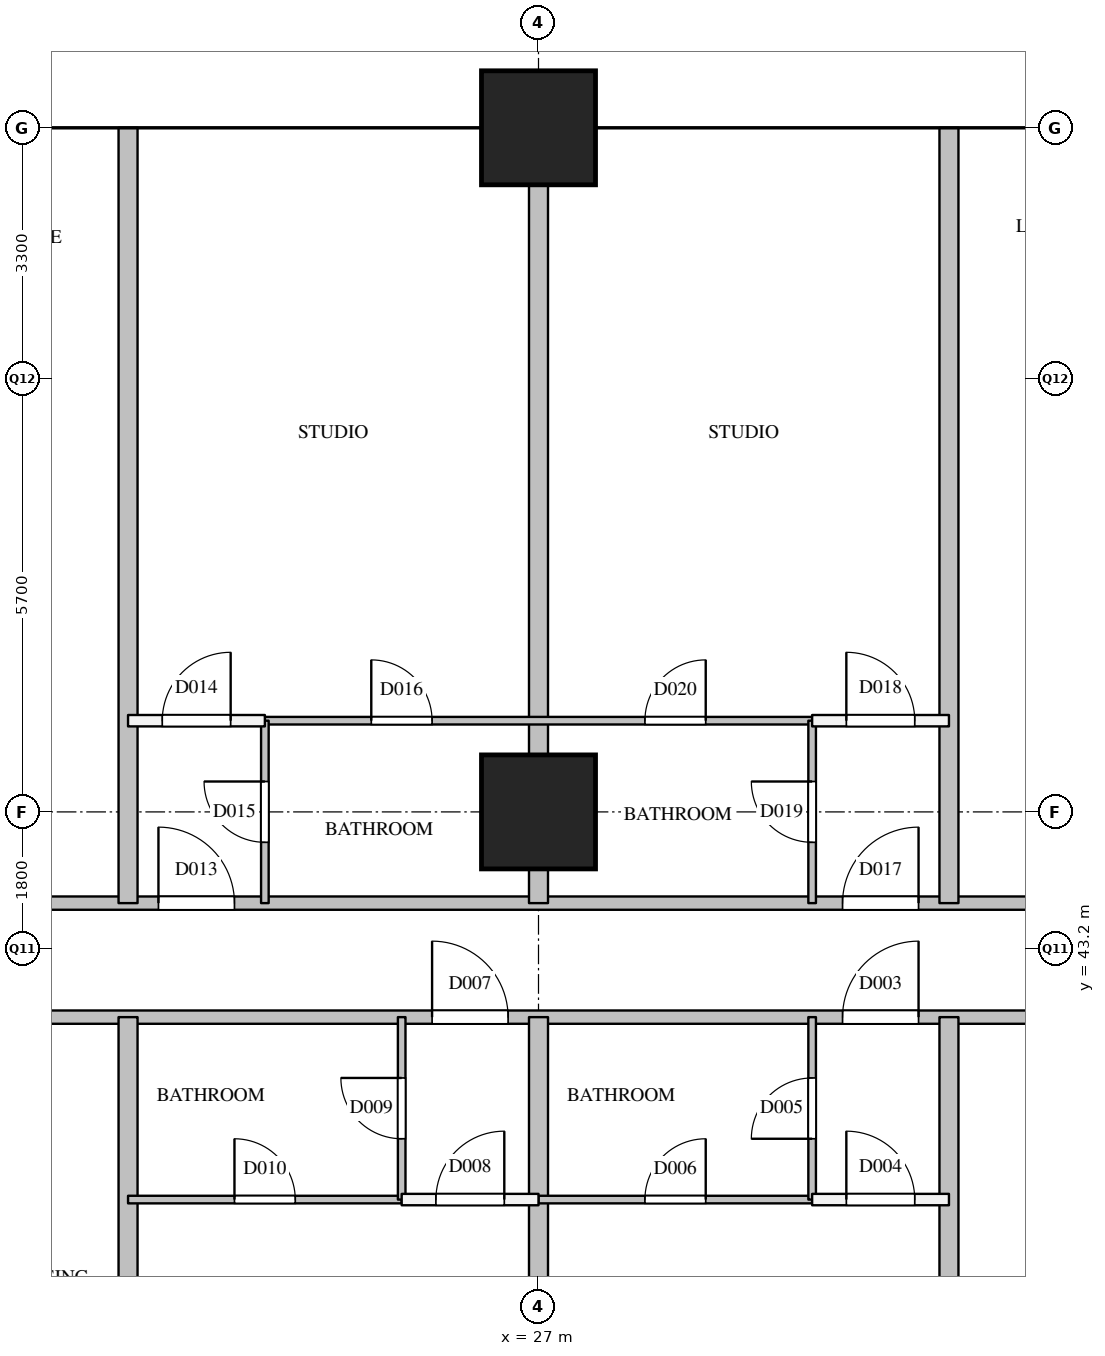
"""IFC4 building model, lengths in metres.
Left out: names, types, materials, properties, quantities, classifications, styles, units other than length and angle.
Written with IfcOpenShell. Run it as: python <this file> out.ifc"""

import sys

from ifc_helpers import new_model, si_unit, direction, frame, frame_2d, origin, origin_2d, place, context, subcontext, project, spatial, rectangle, extrude, element, fill, save


model = new_model("IFC4")
c1 = context("Model", 3, precision=1e-05, world=origin(), true_north=direction((0.0, 1.0)))
c2 = subcontext(c1, "Body", "Model", "MODEL_VIEW")
j1 = project(units=[si_unit("LENGTHUNIT", "METRE"), si_unit("PLANEANGLEUNIT", "RADIAN")], contexts=[c1])
p1 = place(None, origin())
s1 = spatial("IfcSite", under=j1, at=p1, CompositionType="ELEMENT")
p2 = place(p1, origin())
s2 = spatial("IfcBuilding", under=s1, at=p2, CompositionType="ELEMENT")
p3 = place(p2, frame((0.0, 0.0, 193.4)))
s3 = spatial("IfcBuildingStorey", under=s2, at=p3, CompositionType="ELEMENT", Elevation=193.4)
for number, where, z_axis, x_axis in (
    (1, (27.0, 45.0, 0.0), (0.0, 0.0, 1.0), (1.0, 0.0, 0.0)),
    (2, (27.0, 54.0, 0.0), (0.0, 0.0, 1.0), (1.0, 0.0, 0.0)),
):
    element("IfcColumn", number, at=place(p3, frame(where, z_axis=z_axis, x_axis=x_axis)), inside=s3, PredefinedType="COLUMN", context=c2, shape_type="SweptSolid", body=[
        extrude(rectangle(XDim=1.5, YDim=1.5, at=origin_2d()), origin(), (0.0, 0.0, 1.0), 3.9),
    ])
p4 = place(p3, frame((19.5, 42.3, 0.0), z_axis=(0.0, 0.0, 1.0), x_axis=(1.0, 0.0, 0.0)))
e3 = element("IfcWall", 3, at=p4, inside=s3, PredefinedType="PARTITIONING", context=c2, shape_type="SweptSolid", body=[
    extrude(rectangle(XDim=15.0, YDim=0.175, at=frame_2d((7.5, 0.0))), origin(), (0.0, 0.0, 1.0), 2.4),
])
p5 = place(p4, frame((11.5, 0.0, 0.0)))
e4 = element("IfcOpeningElement", 4, at=p5, cuts=e3, PredefinedType="OPENING", context=c2, shape_type="SweptSolid", body=[
    extrude(rectangle(XDim=1.0, YDim=2.1, at=frame_2d((0.5, 1.05))), frame((0.0, 0.097, 0.0), z_axis=(0.0, -1.0, 0.0), x_axis=(1.0, 0.0, 0.0)), (0.0, 0.0, 1.0), 0.195),
])
p6 = place(p4, frame((6.1, 0.0, 0.0)))
e5 = element("IfcOpeningElement", 5, at=p6, cuts=e3, PredefinedType="OPENING", context=c2, shape_type="SweptSolid", body=[
    extrude(rectangle(XDim=1.0, YDim=2.1, at=frame_2d((0.5, 1.05))), frame((0.0, 0.097, 0.0), z_axis=(0.0, -1.0, 0.0), x_axis=(1.0, 0.0, 0.0)), (0.0, 0.0, 1.0), 0.195),
])
p7 = place(p3, frame((19.5, 43.8, 0.0), z_axis=(0.0, 0.0, 1.0), x_axis=(1.0, 0.0, 0.0)))
e6 = element("IfcWall", 6, at=p7, inside=s3, PredefinedType="PARTITIONING", context=c2, shape_type="SweptSolid", body=[
    extrude(rectangle(XDim=15.0, YDim=0.175, at=frame_2d((7.5, 0.0))), origin(), (0.0, 0.0, 1.0), 2.4),
])
p8 = place(p7, frame((2.5, 0.0, 0.0)))
e7 = element("IfcOpeningElement", 7, at=p8, cuts=e6, PredefinedType="OPENING", context=c2, shape_type="SweptSolid", body=[
    extrude(rectangle(XDim=1.0, YDim=2.1, at=frame_2d((0.5, 1.05))), frame((0.0, 0.097, 0.0), z_axis=(0.0, -1.0, 0.0), x_axis=(1.0, 0.0, 0.0)), (0.0, 0.0, 1.0), 0.195),
])
p9 = place(p7, frame((11.5, 0.0, 0.0)))
e8 = element("IfcOpeningElement", 8, at=p9, cuts=e6, PredefinedType="OPENING", context=c2, shape_type="SweptSolid", body=[
    extrude(rectangle(XDim=1.0, YDim=2.1, at=frame_2d((0.5, 1.05))), frame((0.0, 0.097, 0.0), z_axis=(0.0, -1.0, 0.0), x_axis=(1.0, 0.0, 0.0)), (0.0, 0.0, 1.0), 0.195),
])
p10 = place(p3, frame((25.2, 39.9, 0.0), z_axis=(0.0, 0.0, 1.0), x_axis=(1.0, 0.0, 0.0)))
e9 = element("IfcWall", 9, at=p10, inside=s3, PredefinedType="PARTITIONING", context=c2, shape_type="SweptSolid", body=[
    extrude(rectangle(XDim=1.8, YDim=0.15, at=frame_2d((0.9, 0.0))), origin(), (0.0, 0.0, 1.0), 2.4),
])
p11 = place(p10, frame((0.45, 0.0, 0.0)))
e10 = element("IfcOpeningElement", 10, at=p11, cuts=e9, PredefinedType="OPENING", context=c2, shape_type="SweptSolid", body=[
    extrude(rectangle(XDim=0.9, YDim=2.1, at=frame_2d((0.45, 1.05))), frame((0.0, 0.085, 0.0), z_axis=(0.0, -1.0, 0.0), x_axis=(1.0, 0.0, 0.0)), (0.0, 0.0, 1.0), 0.17),
])
p12 = place(p3, frame((30.6, 39.9, 0.0), z_axis=(0.0, 0.0, 1.0), x_axis=(1.0, 0.0, 0.0)))
e11 = element("IfcWall", 11, at=p12, inside=s3, PredefinedType="PARTITIONING", context=c2, shape_type="SweptSolid", body=[
    extrude(rectangle(XDim=1.8, YDim=0.15, at=frame_2d((0.9, 0.0))), origin(), (0.0, 0.0, 1.0), 3.4),
])
p13 = place(p12, frame((0.45, 0.0, 0.0)))
e12 = element("IfcOpeningElement", 12, at=p13, cuts=e11, PredefinedType="OPENING", context=c2, shape_type="SweptSolid", body=[
    extrude(rectangle(XDim=0.9, YDim=2.1, at=frame_2d((0.45, 1.05))), frame((0.0, 0.085, 0.0), z_axis=(0.0, -1.0, 0.0), x_axis=(1.0, 0.0, 0.0)), (0.0, 0.0, 1.0), 0.17),
])
p14 = place(p3, frame((21.6, 46.2, 0.0), z_axis=(0.0, 0.0, 1.0), x_axis=(1.0, 0.0, 0.0)))
e13 = element("IfcWall", 13, at=p14, inside=s3, PredefinedType="PARTITIONING", context=c2, shape_type="SweptSolid", body=[
    extrude(rectangle(XDim=1.8, YDim=0.15, at=frame_2d((0.9, 0.0))), origin(), (0.0, 0.0, 1.0), 3.4),
])
p15 = place(p14, frame((0.45, 0.0, 0.0)))
e14 = element("IfcOpeningElement", 14, at=p15, cuts=e13, PredefinedType="OPENING", context=c2, shape_type="SweptSolid", body=[
    extrude(rectangle(XDim=0.9, YDim=2.1, at=frame_2d((0.45, 1.05))), frame((0.0, 0.085, 0.0), z_axis=(0.0, -1.0, 0.0), x_axis=(1.0, 0.0, 0.0)), (0.0, 0.0, 1.0), 0.17),
])
p16 = place(p3, frame((30.6, 46.2, 0.0), z_axis=(0.0, 0.0, 1.0), x_axis=(1.0, 0.0, 0.0)))
e15 = element("IfcWall", 15, at=p16, inside=s3, PredefinedType="PARTITIONING", context=c2, shape_type="SweptSolid", body=[
    extrude(rectangle(XDim=1.8, YDim=0.15, at=frame_2d((0.9, 0.0))), origin(), (0.0, 0.0, 1.0), 3.4),
])
p17 = place(p16, frame((0.45, 0.0, 0.0)))
e16 = element("IfcOpeningElement", 16, at=p17, cuts=e15, PredefinedType="OPENING", context=c2, shape_type="SweptSolid", body=[
    extrude(rectangle(XDim=0.9, YDim=2.1, at=frame_2d((0.45, 1.05))), frame((0.0, 0.085, 0.0), z_axis=(0.0, -1.0, 0.0), x_axis=(1.0, 0.0, 0.0)), (0.0, 0.0, 1.0), 0.17),
])
p18 = place(p3, frame((21.6, 27.0, 0.0), z_axis=(0.0, 0.0, 1.0), x_axis=(0.0, 1.0, 0.0)))
e17 = element("IfcWall", 17, at=p18, inside=s3, PredefinedType="PARTITIONING", context=c2, shape_type="SweptSolid", body=[
    extrude(rectangle(XDim=15.3, YDim=0.25, at=frame_2d((7.65, 0.0))), origin(), (0.0, 0.0, 1.0), 2.4),
])
p19 = place(p3, frame((21.6, 43.8, 0.0), z_axis=(0.0, 0.0, 1.0), x_axis=(0.0, 1.0, 0.0)))
e18 = element("IfcWall", 18, at=p19, inside=s3, PredefinedType="PARTITIONING", context=c2, shape_type="SweptSolid", body=[
    extrude(rectangle(XDim=10.2, YDim=0.25, at=frame_2d((5.1, 0.0))), origin(), (0.0, 0.0, 1.0), 2.4),
])
p20 = place(p3, frame((27.0, 27.0, 0.0), z_axis=(0.0, 0.0, 1.0), x_axis=(0.0, 1.0, 0.0)))
e19 = element("IfcWall", 19, at=p20, inside=s3, PredefinedType="PARTITIONING", context=c2, shape_type="SweptSolid", body=[
    extrude(rectangle(XDim=15.3, YDim=0.25, at=frame_2d((7.65, 0.0))), origin(), (0.0, 0.0, 1.0), 2.4),
])
p21 = place(p3, frame((27.0, 43.8, 0.0), z_axis=(0.0, 0.0, 1.0), x_axis=(0.0, 1.0, 0.0)))
e20 = element("IfcWall", 20, at=p21, inside=s3, PredefinedType="PARTITIONING", context=c2, shape_type="SweptSolid", body=[
    extrude(rectangle(XDim=10.2, YDim=0.25, at=frame_2d((5.1, 0.0))), origin(), (0.0, 0.0, 1.0), 2.4),
])
p22 = place(p3, frame((32.4, 27.0, 0.0), z_axis=(0.0, 0.0, 1.0), x_axis=(0.0, 1.0, 0.0)))
e21 = element("IfcWall", 21, at=p22, inside=s3, PredefinedType="PARTITIONING", context=c2, shape_type="SweptSolid", body=[
    extrude(rectangle(XDim=15.3, YDim=0.25, at=frame_2d((7.65, 0.0))), origin(), (0.0, 0.0, 1.0), 2.4),
])
p23 = place(p3, frame((32.4, 43.8, 0.0), z_axis=(0.0, 0.0, 1.0), x_axis=(0.0, 1.0, 0.0)))
e22 = element("IfcWall", 22, at=p23, inside=s3, PredefinedType="PARTITIONING", context=c2, shape_type="SweptSolid", body=[
    extrude(rectangle(XDim=10.2, YDim=0.25, at=frame_2d((5.1, 0.0))), origin(), (0.0, 0.0, 1.0), 2.4),
])
p24 = place(p3, frame((21.6, 39.9, 0.0), z_axis=(0.0, 0.0, 1.0), x_axis=(1.0, 0.0, 0.0)))
e23 = element("IfcWall", 23, at=p24, inside=s3, PredefinedType="PARTITIONING", context=c2, shape_type="SweptSolid", body=[
    extrude(rectangle(XDim=3.6, YDim=0.1, at=frame_2d((1.8, 0.0))), origin(), (0.0, 0.0, 1.0), 3.4),
])
p25 = place(p24, frame((1.4, 0.0, 0.0)))
e24 = element("IfcOpeningElement", 24, at=p25, cuts=e23, PredefinedType="OPENING", context=c2, shape_type="SweptSolid", body=[
    extrude(rectangle(XDim=0.8, YDim=2.1, at=frame_2d((0.4, 1.05))), frame((0.0, 0.06, 0.0), z_axis=(0.0, -1.0, 0.0), x_axis=(1.0, 0.0, 0.0)), (0.0, 0.0, 1.0), 0.12),
])
p26 = place(p3, frame((27.0, 39.9, 0.0), z_axis=(0.0, 0.0, 1.0), x_axis=(1.0, 0.0, 0.0)))
e25 = element("IfcWall", 25, at=p26, inside=s3, PredefinedType="PARTITIONING", context=c2, shape_type="SweptSolid", body=[
    extrude(rectangle(XDim=3.6, YDim=0.1, at=frame_2d((1.8, 0.0))), origin(), (0.0, 0.0, 1.0), 2.4),
])
p27 = place(p26, frame((1.4, 0.0, 0.0)))
e26 = element("IfcOpeningElement", 26, at=p27, cuts=e25, PredefinedType="OPENING", context=c2, shape_type="SweptSolid", body=[
    extrude(rectangle(XDim=0.8, YDim=2.1, at=frame_2d((0.4, 1.05))), frame((0.0, 0.06, 0.0), z_axis=(0.0, -1.0, 0.0), x_axis=(1.0, 0.0, 0.0)), (0.0, 0.0, 1.0), 0.12),
])
p28 = place(p3, frame((23.4, 46.2, 0.0), z_axis=(0.0, 0.0, 1.0), x_axis=(1.0, 0.0, 0.0)))
e27 = element("IfcWall", 27, at=p28, inside=s3, PredefinedType="PARTITIONING", context=c2, shape_type="SweptSolid", body=[
    extrude(rectangle(XDim=7.2, YDim=0.1, at=frame_2d((3.6, 0.0))), origin(), (0.0, 0.0, 1.0), 2.4),
])
p29 = place(p28, frame((1.4, 0.0, 0.0)))
e28 = element("IfcOpeningElement", 28, at=p29, cuts=e27, PredefinedType="OPENING", context=c2, shape_type="SweptSolid", body=[
    extrude(rectangle(XDim=0.8, YDim=2.1, at=frame_2d((0.4, 1.05))), frame((0.0, 0.06, 0.0), z_axis=(0.0, -1.0, 0.0), x_axis=(1.0, 0.0, 0.0)), (0.0, 0.0, 1.0), 0.12),
])
p30 = place(p28, frame((5.0, 0.0, 0.0)))
e29 = element("IfcOpeningElement", 29, at=p30, cuts=e27, PredefinedType="OPENING", context=c2, shape_type="SweptSolid", body=[
    extrude(rectangle(XDim=0.8, YDim=2.1, at=frame_2d((0.4, 1.05))), frame((0.0, 0.06, 0.0), z_axis=(0.0, -1.0, 0.0), x_axis=(1.0, 0.0, 0.0)), (0.0, 0.0, 1.0), 0.12),
])
p31 = place(p3, frame((23.4, 43.8, 0.0), z_axis=(0.0, 0.0, 1.0), x_axis=(0.0, 1.0, 0.0)))
e30 = element("IfcWall", 30, at=p31, inside=s3, PredefinedType="PARTITIONING", context=c2, shape_type="SweptSolid", body=[
    extrude(rectangle(XDim=2.4, YDim=0.1, at=frame_2d((1.2, 0.0))), origin(), (0.0, 0.0, 1.0), 3.4),
])
p32 = place(p31, frame((0.8, 0.0, 0.0)))
e31 = element("IfcOpeningElement", 31, at=p32, cuts=e30, PredefinedType="OPENING", context=c2, shape_type="SweptSolid", body=[
    extrude(rectangle(XDim=0.8, YDim=2.1, at=frame_2d((0.4, 1.05))), frame((0.0, 0.06, 0.0), z_axis=(0.0, -1.0, 0.0), x_axis=(1.0, 0.0, 0.0)), (0.0, 0.0, 1.0), 0.12),
])
p33 = place(p3, frame((25.2, 39.9, 0.0), z_axis=(0.0, 0.0, 1.0), x_axis=(0.0, 1.0, 0.0)))
e32 = element("IfcWall", 32, at=p33, inside=s3, PredefinedType="PARTITIONING", context=c2, shape_type="SweptSolid", body=[
    extrude(rectangle(XDim=2.4, YDim=0.1, at=frame_2d((1.2, 0.0))), origin(), (0.0, 0.0, 1.0), 3.4),
])
p34 = place(p33, frame((0.8, 0.0, 0.0)))
e33 = element("IfcOpeningElement", 33, at=p34, cuts=e32, PredefinedType="OPENING", context=c2, shape_type="SweptSolid", body=[
    extrude(rectangle(XDim=0.8, YDim=2.1, at=frame_2d((0.4, 1.05))), frame((0.0, 0.06, 0.0), z_axis=(0.0, -1.0, 0.0), x_axis=(1.0, 0.0, 0.0)), (0.0, 0.0, 1.0), 0.12),
])
p35 = place(p3, frame((30.6, 39.9, 0.0), z_axis=(0.0, 0.0, 1.0), x_axis=(0.0, 1.0, 0.0)))
e34 = element("IfcWall", 34, at=p35, inside=s3, PredefinedType="PARTITIONING", context=c2, shape_type="SweptSolid", body=[
    extrude(rectangle(XDim=2.4, YDim=0.1, at=frame_2d((1.2, 0.0))), origin(), (0.0, 0.0, 1.0), 3.4),
])
p36 = place(p35, frame((0.8, 0.0, 0.0)))
e35 = element("IfcOpeningElement", 35, at=p36, cuts=e34, PredefinedType="OPENING", context=c2, shape_type="SweptSolid", body=[
    extrude(rectangle(XDim=0.8, YDim=2.1, at=frame_2d((0.4, 1.05))), frame((0.0, 0.06, 0.0), z_axis=(0.0, -1.0, 0.0), x_axis=(1.0, 0.0, 0.0)), (0.0, 0.0, 1.0), 0.12),
])
p37 = place(p3, frame((30.6, 43.8, 0.0), z_axis=(0.0, 0.0, 1.0), x_axis=(0.0, 1.0, 0.0)))
e36 = element("IfcWall", 36, at=p37, inside=s3, PredefinedType="PARTITIONING", context=c2, shape_type="SweptSolid", body=[
    extrude(rectangle(XDim=2.4, YDim=0.1, at=frame_2d((1.2, 0.0))), origin(), (0.0, 0.0, 1.0), 3.4),
])
p38 = place(p37, frame((0.8, 0.0, 0.0)))
e37 = element("IfcOpeningElement", 37, at=p38, cuts=e36, PredefinedType="OPENING", context=c2, shape_type="SweptSolid", body=[
    extrude(rectangle(XDim=0.8, YDim=2.1, at=frame_2d((0.4, 1.05))), frame((0.0, 0.06, 0.0), z_axis=(0.0, -1.0, 0.0), x_axis=(1.0, 0.0, 0.0)), (0.0, 0.0, 1.0), 0.12),
])
p39 = place(p5, origin())
e38 = element("IfcDoor", 38, at=p39, inside=s3, OperationType="SINGLE_SWING_RIGHT", PredefinedType="DOOR", context=c2, shape_type="SweptSolid", body=[
    extrude(rectangle(XDim=1.0, YDim=2.1, at=frame_2d((0.5, 1.05))), frame((0.0, 0.025, 0.0), z_axis=(0.0, -1.0, 0.0), x_axis=(1.0, 0.0, 0.0)), (0.0, 0.0, 1.0), 0.05),
])
fill(e4, e38)
p40 = place(p13, origin())
e39 = element("IfcDoor", 39, at=p40, inside=s3, OperationType="SINGLE_SWING_LEFT", PredefinedType="DOOR", context=c2, shape_type="SweptSolid", body=[
    extrude(rectangle(XDim=0.9, YDim=2.1, at=frame_2d((0.45, 1.05))), frame((0.0, 0.025, 0.0), z_axis=(0.0, -1.0, 0.0), x_axis=(1.0, 0.0, 0.0)), (0.0, 0.0, 1.0), 0.05),
])
fill(e12, e39)
p41 = place(p36, origin())
e40 = element("IfcDoor", 40, at=p41, inside=s3, OperationType="SINGLE_SWING_LEFT", PredefinedType="DOOR", context=c2, shape_type="SweptSolid", body=[
    extrude(rectangle(XDim=0.8, YDim=2.1, at=frame_2d((0.4, 1.05))), frame((0.0, 0.025, 0.0), z_axis=(0.0, -1.0, 0.0), x_axis=(1.0, 0.0, 0.0)), (0.0, 0.0, 1.0), 0.05),
])
fill(e35, e40)
p42 = place(p27, origin())
e41 = element("IfcDoor", 41, at=p42, inside=s3, OperationType="SINGLE_SWING_RIGHT", PredefinedType="DOOR", context=c2, shape_type="SweptSolid", body=[
    extrude(rectangle(XDim=0.8, YDim=2.1, at=frame_2d((0.4, 1.05))), frame((0.0, 0.025, 0.0), z_axis=(0.0, -1.0, 0.0), x_axis=(1.0, 0.0, 0.0)), (0.0, 0.0, 1.0), 0.05),
])
fill(e26, e41)
p43 = place(p6, origin())
e42 = element("IfcDoor", 42, at=p43, inside=s3, OperationType="SINGLE_SWING_LEFT", PredefinedType="DOOR", context=c2, shape_type="SweptSolid", body=[
    extrude(rectangle(XDim=1.0, YDim=2.1, at=frame_2d((0.5, 1.05))), frame((0.0, 0.025, 0.0), z_axis=(0.0, -1.0, 0.0), x_axis=(1.0, 0.0, 0.0)), (0.0, 0.0, 1.0), 0.05),
])
fill(e5, e42)
p44 = place(p11, origin())
e43 = element("IfcDoor", 43, at=p44, inside=s3, OperationType="SINGLE_SWING_RIGHT", PredefinedType="DOOR", context=c2, shape_type="SweptSolid", body=[
    extrude(rectangle(XDim=0.9, YDim=2.1, at=frame_2d((0.45, 1.05))), frame((0.0, 0.025, 0.0), z_axis=(0.0, -1.0, 0.0), x_axis=(1.0, 0.0, 0.0)), (0.0, 0.0, 1.0), 0.05),
])
fill(e10, e43)
p45 = place(p34, origin())
e44 = element("IfcDoor", 44, at=p45, inside=s3, OperationType="SINGLE_SWING_RIGHT", PredefinedType="DOOR", context=c2, shape_type="SweptSolid", body=[
    extrude(rectangle(XDim=0.8, YDim=2.1, at=frame_2d((0.4, 1.05))), frame((0.0, 0.025, 0.0), z_axis=(0.0, -1.0, 0.0), x_axis=(1.0, 0.0, 0.0)), (0.0, 0.0, 1.0), 0.05),
])
fill(e33, e44)
p46 = place(p25, origin())
e45 = element("IfcDoor", 45, at=p46, inside=s3, OperationType="SINGLE_SWING_LEFT", PredefinedType="DOOR", context=c2, shape_type="SweptSolid", body=[
    extrude(rectangle(XDim=0.8, YDim=2.1, at=frame_2d((0.4, 1.05))), frame((0.0, 0.025, 0.0), z_axis=(0.0, -1.0, 0.0), x_axis=(1.0, 0.0, 0.0)), (0.0, 0.0, 1.0), 0.05),
])
fill(e24, e45)
p47 = place(p8, origin())
e46 = element("IfcDoor", 46, at=p47, inside=s3, OperationType="SINGLE_SWING_LEFT", PredefinedType="DOOR", context=c2, shape_type="SweptSolid", body=[
    extrude(rectangle(XDim=1.0, YDim=2.1, at=frame_2d((0.5, 1.05))), frame((0.0, 0.025, 0.0), z_axis=(0.0, -1.0, 0.0), x_axis=(1.0, 0.0, 0.0)), (0.0, 0.0, 1.0), 0.05),
])
fill(e7, e46)
p48 = place(p15, origin())
e47 = element("IfcDoor", 47, at=p48, inside=s3, OperationType="SINGLE_SWING_RIGHT", PredefinedType="DOOR", context=c2, shape_type="SweptSolid", body=[
    extrude(rectangle(XDim=0.9, YDim=2.1, at=frame_2d((0.45, 1.05))), frame((0.0, 0.025, 0.0), z_axis=(0.0, -1.0, 0.0), x_axis=(1.0, 0.0, 0.0)), (0.0, 0.0, 1.0), 0.05),
])
fill(e14, e47)
p49 = place(p32, origin())
e48 = element("IfcDoor", 48, at=p49, inside=s3, OperationType="SINGLE_SWING_RIGHT", PredefinedType="DOOR", context=c2, shape_type="SweptSolid", body=[
    extrude(rectangle(XDim=0.8, YDim=2.1, at=frame_2d((0.4, 1.05))), frame((0.0, 0.025, 0.0), z_axis=(0.0, -1.0, 0.0), x_axis=(1.0, 0.0, 0.0)), (0.0, 0.0, 1.0), 0.05),
])
fill(e31, e48)
p50 = place(p29, origin())
e49 = element("IfcDoor", 49, at=p50, inside=s3, OperationType="SINGLE_SWING_LEFT", PredefinedType="DOOR", context=c2, shape_type="SweptSolid", body=[
    extrude(rectangle(XDim=0.8, YDim=2.1, at=frame_2d((0.4, 1.05))), frame((0.0, 0.025, 0.0), z_axis=(0.0, -1.0, 0.0), x_axis=(1.0, 0.0, 0.0)), (0.0, 0.0, 1.0), 0.05),
])
fill(e28, e49)
p51 = place(p9, origin())
e50 = element("IfcDoor", 50, at=p51, inside=s3, OperationType="SINGLE_SWING_RIGHT", PredefinedType="DOOR", context=c2, shape_type="SweptSolid", body=[
    extrude(rectangle(XDim=1.0, YDim=2.1, at=frame_2d((0.5, 1.05))), frame((0.0, 0.025, 0.0), z_axis=(0.0, -1.0, 0.0), x_axis=(1.0, 0.0, 0.0)), (0.0, 0.0, 1.0), 0.05),
])
fill(e8, e50)
p52 = place(p17, origin())
e51 = element("IfcDoor", 51, at=p52, inside=s3, OperationType="SINGLE_SWING_LEFT", PredefinedType="DOOR", context=c2, shape_type="SweptSolid", body=[
    extrude(rectangle(XDim=0.9, YDim=2.1, at=frame_2d((0.45, 1.05))), frame((0.0, 0.025, 0.0), z_axis=(0.0, -1.0, 0.0), x_axis=(1.0, 0.0, 0.0)), (0.0, 0.0, 1.0), 0.05),
])
fill(e16, e51)
p53 = place(p38, origin())
e52 = element("IfcDoor", 52, at=p53, inside=s3, OperationType="SINGLE_SWING_RIGHT", PredefinedType="DOOR", context=c2, shape_type="SweptSolid", body=[
    extrude(rectangle(XDim=0.8, YDim=2.1, at=frame_2d((0.4, 1.05))), frame((0.0, 0.025, 0.0), z_axis=(0.0, -1.0, 0.0), x_axis=(1.0, 0.0, 0.0)), (0.0, 0.0, 1.0), 0.05),
])
fill(e37, e52)
p54 = place(p30, origin())
e53 = element("IfcDoor", 53, at=p54, inside=s3, OperationType="SINGLE_SWING_RIGHT", PredefinedType="DOOR", context=c2, shape_type="SweptSolid", body=[
    extrude(rectangle(XDim=0.8, YDim=2.1, at=frame_2d((0.4, 1.05))), frame((0.0, 0.025, 0.0), z_axis=(0.0, -1.0, 0.0), x_axis=(1.0, 0.0, 0.0)), (0.0, 0.0, 1.0), 0.05),
])
fill(e29, e53)
save(model, sys.argv[1])
